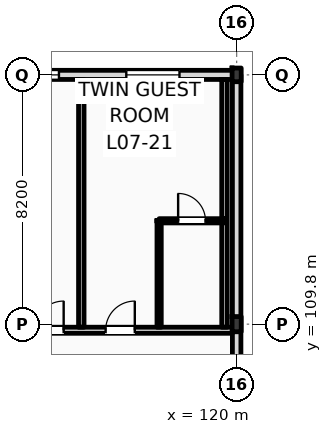
"""IFC4 building model, lengths in metres.
Left out: names, types, materials, properties, quantities, classifications, styles, units other than length and angle.
Written with IfcOpenShell. Run it as: python <this file> out.ifc"""

import sys

from ifc_helpers import new_model, si_unit, direction, frame, frame_2d, origin, origin_2d, place, context, subcontext, project, spatial, rectangle, i_section, extrude, element, fill, save


model = new_model("IFC4")
c1 = context("Model", 3, precision=1e-05, world=origin(), true_north=direction((0.0, 1.0)))
c2 = subcontext(c1, "Body", "Model", "MODEL_VIEW")
j1 = project(units=[si_unit("LENGTHUNIT", "METRE"), si_unit("PLANEANGLEUNIT", "RADIAN")], contexts=[c1])
p1 = place(None, origin())
s1 = spatial("IfcSite", under=j1, at=p1, CompositionType="ELEMENT")
p2 = place(p1, origin())
s2 = spatial("IfcBuilding", under=s1, at=p2, CompositionType="ELEMENT")
p3 = place(p2, frame((0.0, 0.0, 31.8)))
s3 = spatial("IfcBuildingStorey", under=s2, at=p3, CompositionType="ELEMENT", Elevation=31.8)
p4 = place(p3, frame((120.0, 109.8, 0.0), z_axis=(0.0, 0.0, 1.0), x_axis=(1.0, 0.0, 0.0)))
e1 = element("IfcColumn", 1, at=p4, inside=s3, PredefinedType="COLUMN", context=c2, shape_type="SweptSolid", body=[
    extrude(i_section(OverallWidth=0.3, OverallDepth=0.5, WebThickness=0.014, FlangeThickness=0.028, FilletRadius=0.027, at=origin_2d()), origin(), (0.0, 0.0, 1.0), 3.6),
])
p5 = place(p3, frame((120.0, 118.0, 0.0), z_axis=(0.0, 0.0, 1.0), x_axis=(1.0, 0.0, 0.0)))
e2 = element("IfcColumn", 2, at=p5, inside=s3, PredefinedType="COLUMN", context=c2, shape_type="SweptSolid", body=[
    extrude(i_section(OverallWidth=0.3, OverallDepth=0.45, WebThickness=0.014, FlangeThickness=0.026, FilletRadius=0.027, at=origin_2d()), origin(), (0.0, 0.0, 1.0), 3.6),
])
p6 = place(p3, frame((22.5, 118.0, 0.0), z_axis=(0.0, 0.0, 1.0), x_axis=(1.0, 0.0, 0.0)))
e3 = element("IfcWall", 3, at=p6, inside=s3, PredefinedType="STANDARD", context=c2, shape_type="SweptSolid", body=[
    extrude(rectangle(XDim=97.5, YDim=0.3, at=frame_2d((48.75, 0.0))), origin(), (0.0, 0.0, 1.0), 2.72),
])
p7 = place(p6, frame((3.61, 0.0, 0.9)))
e4 = element("IfcOpeningElement", 4, at=p7, cuts=e3, PredefinedType="OPENING", context=c2, shape_type="SweptSolid", body=[
    extrude(rectangle(XDim=1.1, YDim=1.64, at=frame_2d((0.55, 0.82))), frame((0.0, 0.16, 0.0), z_axis=(0.0, -1.0, 0.0), x_axis=(1.0, 0.0, 0.0)), (0.0, 0.0, 1.0), 0.32),
])
p8 = place(p6, frame((6.855, 0.0, 0.0)))
e5 = element("IfcOpeningElement", 5, at=p8, cuts=e3, PredefinedType="OPENING", context=c2, shape_type="SweptSolid", body=[
    extrude(rectangle(XDim=1.2, YDim=2.25, at=frame_2d((0.6, 1.125))), frame((0.0, 0.16, 0.0), z_axis=(0.0, -1.0, 0.0), x_axis=(1.0, 0.0, 0.0)), (0.0, 0.0, 1.0), 0.32),
])
p9 = place(p6, frame((11.405, 0.0, 0.9)))
e6 = element("IfcOpeningElement", 6, at=p9, cuts=e3, PredefinedType="OPENING", context=c2, shape_type="SweptSolid", body=[
    extrude(rectangle(XDim=2.1, YDim=1.64, at=frame_2d((1.05, 0.82))), frame((0.0, 0.16, 0.0), z_axis=(0.0, -1.0, 0.0), x_axis=(1.0, 0.0, 0.0)), (0.0, 0.0, 1.0), 0.32),
])
p10 = place(p6, frame((15.13, 0.0, 0.9)))
e7 = element("IfcOpeningElement", 7, at=p10, cuts=e3, PredefinedType="OPENING", context=c2, shape_type="SweptSolid", body=[
    extrude(rectangle(XDim=2.25, YDim=1.64, at=frame_2d((1.125, 0.82))), frame((0.0, 0.16, 0.0), z_axis=(0.0, -1.0, 0.0), x_axis=(1.0, 0.0, 0.0)), (0.0, 0.0, 1.0), 0.32),
])
p11 = place(p6, frame((21.53, 0.0, 0.0)))
e8 = element("IfcOpeningElement", 8, at=p11, cuts=e3, PredefinedType="OPENING", context=c2, shape_type="SweptSolid", body=[
    extrude(rectangle(XDim=1.2, YDim=2.25, at=frame_2d((0.6, 1.125))), frame((0.0, 0.16, 0.0), z_axis=(0.0, -1.0, 0.0), x_axis=(1.0, 0.0, 0.0)), (0.0, 0.0, 1.0), 0.32),
])
p12 = place(p6, frame((24.18, 0.0, 0.9)))
e9 = element("IfcOpeningElement", 9, at=p12, cuts=e3, PredefinedType="OPENING", context=c2, shape_type="SweptSolid", body=[
    extrude(rectangle(XDim=1.1, YDim=1.64, at=frame_2d((0.55, 0.82))), frame((0.0, 0.16, 0.0), z_axis=(0.0, -1.0, 0.0), x_axis=(1.0, 0.0, 0.0)), (0.0, 0.0, 1.0), 0.32),
])
p13 = place(p6, frame((29.105, 0.0, 0.9)))
e10 = element("IfcOpeningElement", 10, at=p13, cuts=e3, PredefinedType="OPENING", context=c2, shape_type="SweptSolid", body=[
    extrude(rectangle(XDim=2.7, YDim=1.64, at=frame_2d((1.35, 0.82))), frame((0.0, 0.16, 0.0), z_axis=(0.0, -1.0, 0.0), x_axis=(1.0, 0.0, 0.0)), (0.0, 0.0, 1.0), 0.32),
])
p14 = place(p6, frame((34.83, 0.0, 0.9)))
e11 = element("IfcOpeningElement", 11, at=p14, cuts=e3, PredefinedType="OPENING", context=c2, shape_type="SweptSolid", body=[
    extrude(rectangle(XDim=1.8, YDim=1.64, at=frame_2d((0.9, 0.82))), frame((0.0, 0.16, 0.0), z_axis=(0.0, -1.0, 0.0), x_axis=(1.0, 0.0, 0.0)), (0.0, 0.0, 1.0), 0.32),
])
p15 = place(p6, frame((38.525, 0.0, 0.0)))
e12 = element("IfcOpeningElement", 12, at=p15, cuts=e3, PredefinedType="OPENING", context=c2, shape_type="SweptSolid", body=[
    extrude(rectangle(XDim=1.2, YDim=2.25, at=frame_2d((0.6, 1.125))), frame((0.0, 0.16, 0.0), z_axis=(0.0, -1.0, 0.0), x_axis=(1.0, 0.0, 0.0)), (0.0, 0.0, 1.0), 0.32),
])
p16 = place(p6, frame((42.73, 0.0, 0.9)))
e13 = element("IfcOpeningElement", 13, at=p16, cuts=e3, PredefinedType="OPENING", context=c2, shape_type="SweptSolid", body=[
    extrude(rectangle(XDim=3.05, YDim=1.64, at=frame_2d((1.525, 0.82))), frame((0.0, 0.16, 0.0), z_axis=(0.0, -1.0, 0.0), x_axis=(1.0, 0.0, 0.0)), (0.0, 0.0, 1.0), 0.32),
])
p17 = place(p6, frame((47.155, 0.0, 0.9)))
e14 = element("IfcOpeningElement", 14, at=p17, cuts=e3, PredefinedType="OPENING", context=c2, shape_type="SweptSolid", body=[
    extrude(rectangle(XDim=1.35, YDim=1.64, at=frame_2d((0.675, 0.82))), frame((0.0, 0.16, 0.0), z_axis=(0.0, -1.0, 0.0), x_axis=(1.0, 0.0, 0.0)), (0.0, 0.0, 1.0), 0.32),
])
p18 = place(p6, frame((53.065, 0.0, 0.0)))
e15 = element("IfcOpeningElement", 15, at=p18, cuts=e3, PredefinedType="OPENING", context=c2, shape_type="SweptSolid", body=[
    extrude(rectangle(XDim=1.2, YDim=2.25, at=frame_2d((0.6, 1.125))), frame((0.0, 0.16, 0.0), z_axis=(0.0, -1.0, 0.0), x_axis=(1.0, 0.0, 0.0)), (0.0, 0.0, 1.0), 0.32),
])
p19 = place(p6, frame((58.2, 0.0, 0.9)))
e16 = element("IfcOpeningElement", 16, at=p19, cuts=e3, PredefinedType="OPENING", context=c2, shape_type="SweptSolid", body=[
    extrude(rectangle(XDim=1.8, YDim=1.64, at=frame_2d((0.9, 0.82))), frame((0.0, 0.16, 0.0), z_axis=(0.0, -1.0, 0.0), x_axis=(1.0, 0.0, 0.0)), (0.0, 0.0, 1.0), 0.32),
])
p20 = place(p6, frame((61.13, 0.0, 0.9)))
e17 = element("IfcOpeningElement", 17, at=p20, cuts=e3, PredefinedType="OPENING", context=c2, shape_type="SweptSolid", body=[
    extrude(rectangle(XDim=3.05, YDim=1.64, at=frame_2d((1.525, 0.82))), frame((0.0, 0.16, 0.0), z_axis=(0.0, -1.0, 0.0), x_axis=(1.0, 0.0, 0.0)), (0.0, 0.0, 1.0), 0.32),
])
p21 = place(p6, frame((67.93, 0.0, 0.0)))
e18 = element("IfcOpeningElement", 18, at=p21, cuts=e3, PredefinedType="OPENING", context=c2, shape_type="SweptSolid", body=[
    extrude(rectangle(XDim=1.2, YDim=2.25, at=frame_2d((0.6, 1.125))), frame((0.0, 0.16, 0.0), z_axis=(0.0, -1.0, 0.0), x_axis=(1.0, 0.0, 0.0)), (0.0, 0.0, 1.0), 0.32),
])
p22 = place(p6, frame((70.39, 0.0, 0.0)))
e19 = element("IfcOpeningElement", 19, at=p22, cuts=e3, PredefinedType="OPENING", context=c2, shape_type="SweptSolid", body=[
    extrude(rectangle(XDim=1.2, YDim=2.25, at=frame_2d((0.6, 1.125))), frame((0.0, 0.16, 0.0), z_axis=(0.0, -1.0, 0.0), x_axis=(1.0, 0.0, 0.0)), (0.0, 0.0, 1.0), 0.32),
])
p23 = place(p6, frame((75.905, 0.0, 0.9)))
e20 = element("IfcOpeningElement", 20, at=p23, cuts=e3, PredefinedType="OPENING", context=c2, shape_type="SweptSolid", body=[
    extrude(rectangle(XDim=1.1, YDim=1.5, at=frame_2d((0.55, 0.75))), frame((0.0, 0.16, 0.0), z_axis=(0.0, -1.0, 0.0), x_axis=(1.0, 0.0, 0.0)), (0.0, 0.0, 1.0), 0.32),
])
p24 = place(p6, frame((81.63, 0.0, 0.9)))
e21 = element("IfcOpeningElement", 21, at=p24, cuts=e3, PredefinedType="OPENING", context=c2, shape_type="SweptSolid", body=[
    extrude(rectangle(XDim=1.1, YDim=1.6, at=frame_2d((0.55, 0.8))), frame((0.0, 0.16, 0.0), z_axis=(0.0, -1.0, 0.0), x_axis=(1.0, 0.0, 0.0)), (0.0, 0.0, 1.0), 0.32),
])
p25 = place(p6, frame((84.955, 0.0, 0.9)))
e22 = element("IfcOpeningElement", 22, at=p25, cuts=e3, PredefinedType="OPENING", context=c2, shape_type="SweptSolid", body=[
    extrude(rectangle(XDim=1.4, YDim=1.64, at=frame_2d((0.7, 0.82))), frame((0.0, 0.16, 0.0), z_axis=(0.0, -1.0, 0.0), x_axis=(1.0, 0.0, 0.0)), (0.0, 0.0, 1.0), 0.32),
])
p26 = place(p6, frame((90.055, 0.0, 0.9)))
e23 = element("IfcOpeningElement", 23, at=p26, cuts=e3, PredefinedType="OPENING", context=c2, shape_type="SweptSolid", body=[
    extrude(rectangle(XDim=1.6, YDim=1.64, at=frame_2d((0.8, 0.82))), frame((0.0, 0.16, 0.0), z_axis=(0.0, -1.0, 0.0), x_axis=(1.0, 0.0, 0.0)), (0.0, 0.0, 1.0), 0.32),
])
p27 = place(p6, frame((93.87, 0.0, 0.9)))
e24 = element("IfcOpeningElement", 24, at=p27, cuts=e3, PredefinedType="OPENING", context=c2, shape_type="SweptSolid", body=[
    extrude(rectangle(XDim=1.75, YDim=1.64, at=frame_2d((0.875, 0.82))), frame((0.0, 0.16, 0.0), z_axis=(0.0, -1.0, 0.0), x_axis=(1.0, 0.0, 0.0)), (0.0, 0.0, 1.0), 0.32),
])
p28 = place(p3, frame((120.0, 96.0, 0.0), z_axis=(0.0, 0.0, 1.0), x_axis=(0.0, 1.0, 0.0)))
e25 = element("IfcWall", 25, at=p28, inside=s3, PredefinedType="STANDARD", context=c2, shape_type="SweptSolid", body=[
    extrude(rectangle(XDim=22.0, YDim=0.28, at=frame_2d((11.0, 0.0))), origin(), (0.0, 0.0, 1.0), 2.91),
])
p29 = place(p3, frame((10.65, 109.6, 0.0), z_axis=(0.0, 0.0, 1.0), x_axis=(1.0, 0.0, 0.0)))
e26 = element("IfcWall", 26, at=p29, inside=s3, PredefinedType="PARTITIONING", context=c2, shape_type="SweptSolid", body=[
    extrude(rectangle(XDim=109.21, YDim=0.2, at=frame_2d((54.605, 0.0))), origin(), (0.0, 0.0, 1.0), 2.72),
])
p30 = place(p29, frame((15.825, 0.0, 0.0)))
e27 = element("IfcOpeningElement", 27, at=p30, cuts=e26, PredefinedType="OPENING", context=c2, shape_type="SweptSolid", body=[
    extrude(rectangle(XDim=1.02, YDim=2.2, at=frame_2d((0.51, 1.1))), frame((0.0, 0.11, 0.0), z_axis=(0.0, -1.0, 0.0), x_axis=(1.0, 0.0, 0.0)), (0.0, 0.0, 1.0), 0.22),
])
p31 = place(p29, frame((19.87, 0.0, 0.0)))
e28 = element("IfcOpeningElement", 28, at=p31, cuts=e26, PredefinedType="OPENING", context=c2, shape_type="SweptSolid", body=[
    extrude(rectangle(XDim=1.02, YDim=2.2, at=frame_2d((0.51, 1.1))), frame((0.0, 0.11, 0.0), z_axis=(0.0, -1.0, 0.0), x_axis=(1.0, 0.0, 0.0)), (0.0, 0.0, 1.0), 0.22),
])
p32 = place(p29, frame((24.47, 0.0, 0.0)))
e29 = element("IfcOpeningElement", 29, at=p32, cuts=e26, PredefinedType="OPENING", context=c2, shape_type="SweptSolid", body=[
    extrude(rectangle(XDim=1.02, YDim=2.2, at=frame_2d((0.51, 1.1))), frame((0.0, 0.11, 0.0), z_axis=(0.0, -1.0, 0.0), x_axis=(1.0, 0.0, 0.0)), (0.0, 0.0, 1.0), 0.22),
])
p33 = place(p29, frame((26.92, 0.0, 0.0)))
e30 = element("IfcOpeningElement", 30, at=p33, cuts=e26, PredefinedType="OPENING", context=c2, shape_type="SweptSolid", body=[
    extrude(rectangle(XDim=1.02, YDim=2.2, at=frame_2d((0.51, 1.1))), frame((0.0, 0.11, 0.0), z_axis=(0.0, -1.0, 0.0), x_axis=(1.0, 0.0, 0.0)), (0.0, 0.0, 1.0), 0.22),
])
p34 = place(p29, frame((33.7, 0.0, 0.0)))
e31 = element("IfcOpeningElement", 31, at=p34, cuts=e26, PredefinedType="OPENING", context=c2, shape_type="SweptSolid", body=[
    extrude(rectangle(XDim=0.96, YDim=2.2, at=frame_2d((0.48, 1.1))), frame((0.0, 0.11, 0.0), z_axis=(0.0, -1.0, 0.0), x_axis=(1.0, 0.0, 0.0)), (0.0, 0.0, 1.0), 0.22),
])
p35 = place(p29, frame((35.9, 0.0, 0.0)))
e32 = element("IfcOpeningElement", 32, at=p35, cuts=e26, PredefinedType="OPENING", context=c2, shape_type="SweptSolid", body=[
    extrude(rectangle(XDim=0.96, YDim=2.2, at=frame_2d((0.48, 1.1))), frame((0.0, 0.11, 0.0), z_axis=(0.0, -1.0, 0.0), x_axis=(1.0, 0.0, 0.0)), (0.0, 0.0, 1.0), 0.22),
])
p36 = place(p29, frame((42.9, 0.0, 0.0)))
e33 = element("IfcOpeningElement", 33, at=p36, cuts=e26, PredefinedType="OPENING", context=c2, shape_type="SweptSolid", body=[
    extrude(rectangle(XDim=0.96, YDim=2.2, at=frame_2d((0.48, 1.1))), frame((0.0, 0.11, 0.0), z_axis=(0.0, -1.0, 0.0), x_axis=(1.0, 0.0, 0.0)), (0.0, 0.0, 1.0), 0.22),
])
p37 = place(p29, frame((47.5, 0.0, 0.0)))
e34 = element("IfcOpeningElement", 34, at=p37, cuts=e26, PredefinedType="OPENING", context=c2, shape_type="SweptSolid", body=[
    extrude(rectangle(XDim=0.96, YDim=2.2, at=frame_2d((0.48, 1.1))), frame((0.0, 0.11, 0.0), z_axis=(0.0, -1.0, 0.0), x_axis=(1.0, 0.0, 0.0)), (0.0, 0.0, 1.0), 0.22),
])
p38 = place(p29, frame((49.95, 0.0, 0.0)))
e35 = element("IfcOpeningElement", 35, at=p38, cuts=e26, PredefinedType="OPENING", context=c2, shape_type="SweptSolid", body=[
    extrude(rectangle(XDim=0.96, YDim=2.2, at=frame_2d((0.48, 1.1))), frame((0.0, 0.11, 0.0), z_axis=(0.0, -1.0, 0.0), x_axis=(1.0, 0.0, 0.0)), (0.0, 0.0, 1.0), 0.22),
])
p39 = place(p29, frame((56.7, 0.0, 0.0)))
e36 = element("IfcOpeningElement", 36, at=p39, cuts=e26, PredefinedType="OPENING", context=c2, shape_type="SweptSolid", body=[
    extrude(rectangle(XDim=0.96, YDim=2.2, at=frame_2d((0.48, 1.1))), frame((0.0, 0.11, 0.0), z_axis=(0.0, -1.0, 0.0), x_axis=(1.0, 0.0, 0.0)), (0.0, 0.0, 1.0), 0.22),
])
p40 = place(p29, frame((59.15, 0.0, 0.0)))
e37 = element("IfcOpeningElement", 37, at=p40, cuts=e26, PredefinedType="OPENING", context=c2, shape_type="SweptSolid", body=[
    extrude(rectangle(XDim=0.96, YDim=2.2, at=frame_2d((0.48, 1.1))), frame((0.0, 0.11, 0.0), z_axis=(0.0, -1.0, 0.0), x_axis=(1.0, 0.0, 0.0)), (0.0, 0.0, 1.0), 0.22),
])
p41 = place(p29, frame((65.9, 0.0, 0.0)))
e38 = element("IfcOpeningElement", 38, at=p41, cuts=e26, PredefinedType="OPENING", context=c2, shape_type="SweptSolid", body=[
    extrude(rectangle(XDim=0.96, YDim=2.2, at=frame_2d((0.48, 1.1))), frame((0.0, 0.11, 0.0), z_axis=(0.0, -1.0, 0.0), x_axis=(1.0, 0.0, 0.0)), (0.0, 0.0, 1.0), 0.22),
])
p42 = place(p29, frame((70.5, 0.0, 0.0)))
e39 = element("IfcOpeningElement", 39, at=p42, cuts=e26, PredefinedType="OPENING", context=c2, shape_type="SweptSolid", body=[
    extrude(rectangle(XDim=0.96, YDim=2.2, at=frame_2d((0.48, 1.1))), frame((0.0, 0.11, 0.0), z_axis=(0.0, -1.0, 0.0), x_axis=(1.0, 0.0, 0.0)), (0.0, 0.0, 1.0), 0.22),
])
p43 = place(p29, frame((72.95, 0.0, 0.0)))
e40 = element("IfcOpeningElement", 40, at=p43, cuts=e26, PredefinedType="OPENING", context=c2, shape_type="SweptSolid", body=[
    extrude(rectangle(XDim=0.96, YDim=2.2, at=frame_2d((0.48, 1.1))), frame((0.0, 0.11, 0.0), z_axis=(0.0, -1.0, 0.0), x_axis=(1.0, 0.0, 0.0)), (0.0, 0.0, 1.0), 0.22),
])
p44 = place(p29, frame((79.7, 0.0, 0.0)))
e41 = element("IfcOpeningElement", 41, at=p44, cuts=e26, PredefinedType="OPENING", context=c2, shape_type="SweptSolid", body=[
    extrude(rectangle(XDim=0.96, YDim=2.2, at=frame_2d((0.48, 1.1))), frame((0.0, 0.11, 0.0), z_axis=(0.0, -1.0, 0.0), x_axis=(1.0, 0.0, 0.0)), (0.0, 0.0, 1.0), 0.22),
])
p45 = place(p29, frame((82.15, 0.0, 0.0)))
e42 = element("IfcOpeningElement", 42, at=p45, cuts=e26, PredefinedType="OPENING", context=c2, shape_type="SweptSolid", body=[
    extrude(rectangle(XDim=0.96, YDim=2.2, at=frame_2d((0.48, 1.1))), frame((0.0, 0.11, 0.0), z_axis=(0.0, -1.0, 0.0), x_axis=(1.0, 0.0, 0.0)), (0.0, 0.0, 1.0), 0.22),
])
p46 = place(p29, frame((88.9, 0.0, 0.0)))
e43 = element("IfcOpeningElement", 43, at=p46, cuts=e26, PredefinedType="OPENING", context=c2, shape_type="SweptSolid", body=[
    extrude(rectangle(XDim=0.96, YDim=2.2, at=frame_2d((0.48, 1.1))), frame((0.0, 0.11, 0.0), z_axis=(0.0, -1.0, 0.0), x_axis=(1.0, 0.0, 0.0)), (0.0, 0.0, 1.0), 0.22),
])
p47 = place(p29, frame((93.75, 0.0, 0.0)))
e44 = element("IfcOpeningElement", 44, at=p47, cuts=e26, PredefinedType="OPENING", context=c2, shape_type="SweptSolid", body=[
    extrude(rectangle(XDim=0.96, YDim=2.2, at=frame_2d((0.48, 1.1))), frame((0.0, 0.11, 0.0), z_axis=(0.0, -1.0, 0.0), x_axis=(1.0, 0.0, 0.0)), (0.0, 0.0, 1.0), 0.22),
])
p48 = place(p29, frame((98.1, 0.0, 0.0)))
e45 = element("IfcOpeningElement", 45, at=p48, cuts=e26, PredefinedType="OPENING", context=c2, shape_type="SweptSolid", body=[
    extrude(rectangle(XDim=0.96, YDim=2.2, at=frame_2d((0.48, 1.1))), frame((0.0, 0.11, 0.0), z_axis=(0.0, -1.0, 0.0), x_axis=(1.0, 0.0, 0.0)), (0.0, 0.0, 1.0), 0.22),
])
p49 = place(p29, frame((102.7, 0.0, 0.0)))
e46 = element("IfcOpeningElement", 46, at=p49, cuts=e26, PredefinedType="OPENING", context=c2, shape_type="SweptSolid", body=[
    extrude(rectangle(XDim=0.96, YDim=2.2, at=frame_2d((0.48, 1.1))), frame((0.0, 0.11, 0.0), z_axis=(0.0, -1.0, 0.0), x_axis=(1.0, 0.0, 0.0)), (0.0, 0.0, 1.0), 0.22),
])
p50 = place(p29, frame((105.04, 0.0, 0.0)))
e47 = element("IfcOpeningElement", 47, at=p50, cuts=e26, PredefinedType="OPENING", context=c2, shape_type="SweptSolid", body=[
    extrude(rectangle(XDim=0.96, YDim=2.2, at=frame_2d((0.48, 1.1))), frame((0.0, 0.11, 0.0), z_axis=(0.0, -1.0, 0.0), x_axis=(1.0, 0.0, 0.0)), (0.0, 0.0, 1.0), 0.22),
])
p51 = place(p29, frame((2.716, 0.0, 0.0)))
e48 = element("IfcOpeningElement", 48, at=p51, cuts=e26, PredefinedType="OPENING", context=c2, shape_type="SweptSolid", body=[
    extrude(rectangle(XDim=1.35, YDim=2.25, at=frame_2d((0.675, 1.125))), frame((0.0, 0.11, 0.0), z_axis=(0.0, -1.0, 0.0), x_axis=(1.0, 0.0, 0.0)), (0.0, 0.0, 1.0), 0.22),
])
p52 = place(p29, frame((6.65, 0.0, 0.0)))
e49 = element("IfcOpeningElement", 49, at=p52, cuts=e26, PredefinedType="OPENING", context=c2, shape_type="SweptSolid", body=[
    extrude(rectangle(XDim=1.35, YDim=2.25, at=frame_2d((0.675, 1.125))), frame((0.0, 0.11, 0.0), z_axis=(0.0, -1.0, 0.0), x_axis=(1.0, 0.0, 0.0)), (0.0, 0.0, 1.0), 0.22),
])
p53 = place(p29, frame((10.583, 0.0, 0.0)))
e50 = element("IfcOpeningElement", 50, at=p53, cuts=e26, PredefinedType="OPENING", context=c2, shape_type="SweptSolid", body=[
    extrude(rectangle(XDim=1.35, YDim=2.25, at=frame_2d((0.675, 1.125))), frame((0.0, 0.11, 0.0), z_axis=(0.0, -1.0, 0.0), x_axis=(1.0, 0.0, 0.0)), (0.0, 0.0, 1.0), 0.22),
])
for number, where, z_axis, x_axis in (
    (51, (114.89, 109.7, 0.0), (0.0, 0.0, 1.0), (0.0, 1.0, 0.0)),
    (52, (119.6, 109.7, 0.0), (0.0, 0.0, 1.0), (0.0, 1.0, 0.0)),
):
    element("IfcWall", number, at=place(p3, frame(where, z_axis=z_axis, x_axis=x_axis)), inside=s3, PredefinedType="PARTITIONING", context=c2, shape_type="SweptSolid", body=[
        extrude(rectangle(XDim=8.15, YDim=0.18, at=frame_2d((4.075, 0.0))), origin(), (0.0, 0.0, 1.0), 3.36),
    ])
p54 = place(p3, frame((117.45, 109.7, 0.0), z_axis=(0.0, 0.0, 1.0), x_axis=(0.0, 1.0, 0.0)))
e53 = element("IfcWall", 53, at=p54, inside=s3, PredefinedType="PARTITIONING", context=c2, shape_type="SweptSolid", body=[
    extrude(rectangle(XDim=3.5, YDim=0.14, at=frame_2d((1.75, 0.0))), origin(), (0.0, 0.0, 1.0), 3.36),
])
p55 = place(p3, frame((117.45, 113.2, 0.0), z_axis=(0.0, 0.0, 1.0), x_axis=(1.0, 0.0, 0.0)))
e54 = element("IfcWall", 54, at=p55, inside=s3, PredefinedType="PARTITIONING", context=c2, shape_type="SweptSolid", body=[
    extrude(rectangle(XDim=2.15, YDim=0.14, at=frame_2d((1.075, 0.0))), origin(), (0.0, 0.0, 1.0), 3.36),
])
p56 = place(p55, frame((0.625, 0.0, 0.0)))
e55 = element("IfcOpeningElement", 55, at=p56, cuts=e54, PredefinedType="OPENING", context=c2, shape_type="SweptSolid", body=[
    extrude(rectangle(XDim=0.9, YDim=2.1, at=frame_2d((0.45, 1.05))), frame((0.0, 0.08, 0.0), z_axis=(0.0, -1.0, 0.0), x_axis=(1.0, 0.0, 0.0)), (0.0, 0.0, 1.0), 0.16),
])
p57 = place(p26, origin())
e56 = element("IfcWindow", 56, at=p57, inside=s3, PartitioningType="DOUBLE_PANEL_VERTICAL", PredefinedType="WINDOW", context=c2, shape_type="SweptSolid", body=[
    extrude(rectangle(XDim=1.6, YDim=1.64, at=frame_2d((0.8, 0.82))), frame((0.0, 0.03, 0.0), z_axis=(0.0, -1.0, 0.0), x_axis=(1.0, 0.0, 0.0)), (0.0, 0.0, 1.0), 0.06),
])
fill(e23, e56)
p58 = place(p27, origin())
e57 = element("IfcWindow", 57, at=p58, inside=s3, PartitioningType="DOUBLE_PANEL_VERTICAL", PredefinedType="WINDOW", context=c2, shape_type="SweptSolid", body=[
    extrude(rectangle(XDim=1.75, YDim=1.64, at=frame_2d((0.875, 0.82))), frame((0.0, 0.03, 0.0), z_axis=(0.0, -1.0, 0.0), x_axis=(1.0, 0.0, 0.0)), (0.0, 0.0, 1.0), 0.06),
])
fill(e24, e57)
p59 = place(p49, origin())
e58 = element("IfcDoor", 58, at=p59, inside=s3, OperationType="SINGLE_SWING_RIGHT", PredefinedType="DOOR", context=c2, shape_type="SweptSolid", body=[
    extrude(rectangle(XDim=0.96, YDim=2.2, at=frame_2d((0.48, 1.1))), frame((0.0, 0.025, 0.0), z_axis=(0.0, -1.0, 0.0), x_axis=(1.0, 0.0, 0.0)), (0.0, 0.0, 1.0), 0.05),
])
fill(e46, e58)
p60 = place(p50, origin())
e59 = element("IfcDoor", 59, at=p60, inside=s3, OperationType="SINGLE_SWING_RIGHT", PredefinedType="DOOR", context=c2, shape_type="SweptSolid", body=[
    extrude(rectangle(XDim=0.96, YDim=2.2, at=frame_2d((0.48, 1.1))), frame((0.0, 0.025, 0.0), z_axis=(0.0, -1.0, 0.0), x_axis=(1.0, 0.0, 0.0)), (0.0, 0.0, 1.0), 0.05),
])
fill(e47, e59)
p61 = place(p56, origin())
e60 = element("IfcDoor", 60, at=p61, inside=s3, OperationType="SINGLE_SWING_LEFT", PredefinedType="DOOR", context=c2, shape_type="SweptSolid", body=[
    extrude(rectangle(XDim=0.9, YDim=2.1, at=frame_2d((0.45, 1.05))), frame((0.0, 0.025, 0.0), z_axis=(0.0, -1.0, 0.0), x_axis=(1.0, 0.0, 0.0)), (0.0, 0.0, 1.0), 0.05),
])
fill(e55, e60)
save(model, sys.argv[1])
